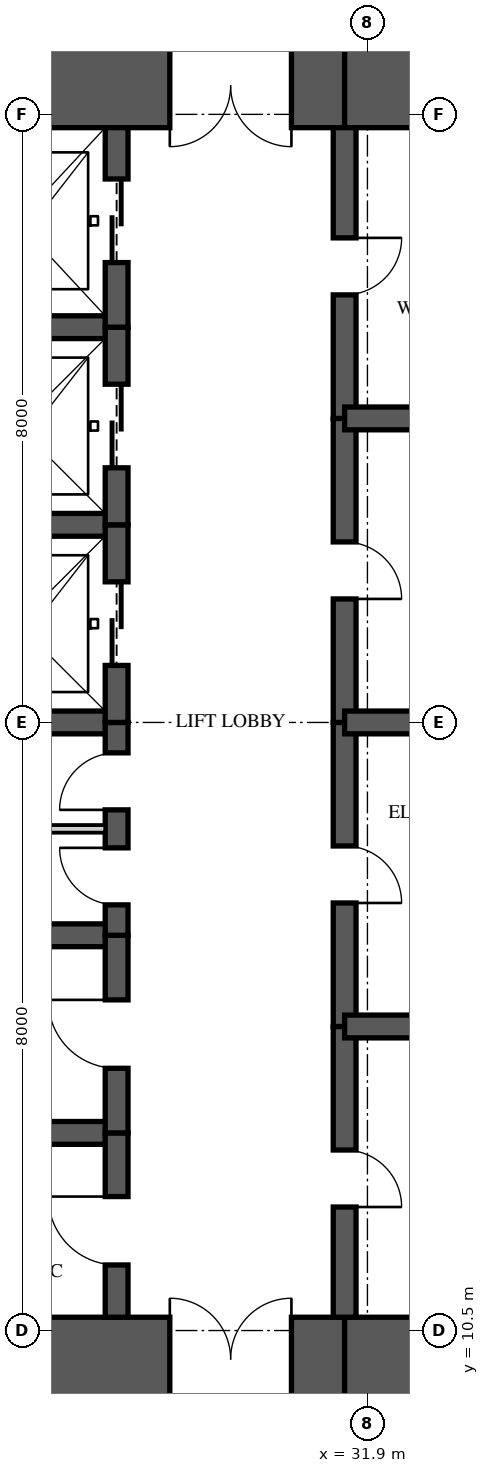
"""IFC4 building model, lengths in metres.
Left out: names, types, materials, properties, quantities, classifications, styles, units other than length and angle.
Written with IfcOpenShell. Run it as: python <this file> out.ifc"""

import sys

from ifc_helpers import new_model, si_unit, direction, frame, frame_2d, origin, place, context, subcontext, project, spatial, rectangle, extrude, element, fill, save


model = new_model("IFC4")
c1 = context("Model", 3, precision=1e-05, world=origin(), true_north=direction((0.0, 1.0)))
c2 = subcontext(c1, "Body", "Model", "MODEL_VIEW")
j1 = project(units=[si_unit("LENGTHUNIT", "METRE"), si_unit("PLANEANGLEUNIT", "RADIAN")], contexts=[c1])
p1 = place(None, origin())
s1 = spatial("IfcSite", under=j1, at=p1, CompositionType="ELEMENT")
p2 = place(p1, origin())
s2 = spatial("IfcBuilding", under=s1, at=p2, CompositionType="ELEMENT")
p3 = place(p2, frame((0.0, 0.0, 249.45)))
s3 = spatial("IfcBuildingStorey", under=s2, at=p3, CompositionType="ELEMENT", Elevation=249.45)
p4 = place(p3, frame((26.0, 10.125, 0.0), z_axis=(0.0, 0.0, 1.0), x_axis=(1.0, 0.0, 0.0)))
e1 = element("IfcWall", 1, at=p4, inside=s3, PredefinedType="SHEAR", context=c2, shape_type="SweptSolid", body=[
    extrude(rectangle(XDim=5.6, YDim=1.1, at=frame_2d((2.8, 0.0))), origin(), (0.0, 0.0, 1.0), 3.5),
])
p5 = place(p4, frame((3.3, 0.0, 0.0)))
e2 = element("IfcOpeningElement", 2, at=p5, cuts=e1, PredefinedType="OPENING", context=c2, shape_type="SweptSolid", body=[
    extrude(rectangle(XDim=1.6, YDim=2.1, at=frame_2d((0.8, 1.05))), frame((0.0, 0.56, 0.0), z_axis=(0.0, -1.0, 0.0), x_axis=(1.0, 0.0, 0.0)), (0.0, 0.0, 1.0), 1.12),
])
for number, where, z_axis, x_axis in (
    (3, (31.6, 10.125, 0.0), (0.0, 0.0, 1.0), (1.0, 0.0, 0.0)),
    (4, (35.9, 26.875, 0.0), (0.0, 0.0, 1.0), (-1.0, 0.0, 0.0)),
):
    element("IfcWall", number, at=place(p3, frame(where, z_axis=z_axis, x_axis=x_axis)), inside=s3, PredefinedType="SHEAR", context=c2, shape_type="SweptSolid", body=[
        extrude(rectangle(XDim=4.3, YDim=1.1, at=frame_2d((2.15, 0.0))), origin(), (0.0, 0.0, 1.0), 3.5),
    ])
p6 = place(p3, frame((31.6, 26.875, 0.0), z_axis=(0.0, 0.0, 1.0), x_axis=(-1.0, 0.0, 0.0)))
e5 = element("IfcWall", 5, at=p6, inside=s3, PredefinedType="SHEAR", context=c2, shape_type="SweptSolid", body=[
    extrude(rectangle(XDim=5.6, YDim=1.1, at=frame_2d((2.8, 0.0))), origin(), (0.0, 0.0, 1.0), 3.5),
])
p7 = place(p6, frame((0.7, 0.0, 0.0)))
e6 = element("IfcOpeningElement", 6, at=p7, cuts=e5, PredefinedType="OPENING", context=c2, shape_type="SweptSolid", body=[
    extrude(rectangle(XDim=1.6, YDim=2.1, at=frame_2d((0.8, 1.05))), frame((0.0, 0.56, 0.0), z_axis=(0.0, -1.0, 0.0), x_axis=(1.0, 0.0, 0.0)), (0.0, 0.0, 1.0), 1.12),
])
p8 = place(p3, frame((28.6, 10.675, 0.0), z_axis=(0.0, 0.0, 1.0), x_axis=(0.0, 1.0, 0.0)))
e7 = element("IfcWall", 7, at=p8, inside=s3, PredefinedType="SHEAR", context=c2, shape_type="SweptSolid", body=[
    extrude(rectangle(XDim=2.425, YDim=0.3, at=frame_2d((1.212, 0.0))), origin(), (0.0, 0.0, 1.0), 3.5),
])
p9 = place(p8, frame((0.688, 0.0, 0.0)))
e8 = element("IfcOpeningElement", 8, at=p9, cuts=e7, PredefinedType="OPENING", context=c2, shape_type="SweptSolid", body=[
    extrude(rectangle(XDim=0.9, YDim=2.1, at=frame_2d((0.45, 1.05))), frame((0.0, 0.16, 0.0), z_axis=(0.0, -1.0, 0.0), x_axis=(1.0, 0.0, 0.0)), (0.0, 0.0, 1.0), 0.32),
])
p10 = place(p3, frame((28.6, 13.1, 0.0), z_axis=(0.0, 0.0, 1.0), x_axis=(0.0, 1.0, 0.0)))
e9 = element("IfcWall", 9, at=p10, inside=s3, PredefinedType="SHEAR", context=c2, shape_type="SweptSolid", body=[
    extrude(rectangle(XDim=2.6, YDim=0.3, at=frame_2d((1.3, 0.0))), origin(), (0.0, 0.0, 1.0), 3.5),
])
p11 = place(p10, frame((0.85, 0.0, 0.0)))
e10 = element("IfcOpeningElement", 10, at=p11, cuts=e9, PredefinedType="OPENING", context=c2, shape_type="SweptSolid", body=[
    extrude(rectangle(XDim=0.9, YDim=2.1, at=frame_2d((0.45, 1.05))), frame((0.0, 0.16, 0.0), z_axis=(0.0, -1.0, 0.0), x_axis=(1.0, 0.0, 0.0)), (0.0, 0.0, 1.0), 0.32),
])
p12 = place(p3, frame((28.6, 15.7, 0.0), z_axis=(0.0, 0.0, 1.0), x_axis=(0.0, 1.0, 0.0)))
e11 = element("IfcWall", 11, at=p12, inside=s3, PredefinedType="SHEAR", context=c2, shape_type="SweptSolid", body=[
    extrude(rectangle(XDim=2.8, YDim=0.3, at=frame_2d((1.4, 0.0))), origin(), (0.0, 0.0, 1.0), 3.5),
])
p13 = place(p12, frame((0.4, 0.0, 0.0)))
e12 = element("IfcOpeningElement", 12, at=p13, cuts=e11, PredefinedType="OPENING", context=c2, shape_type="SweptSolid", body=[
    extrude(rectangle(XDim=0.75, YDim=2.1, at=frame_2d((0.375, 1.05))), frame((0.0, 0.16, 0.0), z_axis=(0.0, -1.0, 0.0), x_axis=(1.0, 0.0, 0.0)), (0.0, 0.0, 1.0), 0.32),
])
p14 = place(p12, frame((1.65, 0.0, 0.0)))
e13 = element("IfcOpeningElement", 13, at=p14, cuts=e11, PredefinedType="OPENING", context=c2, shape_type="SweptSolid", body=[
    extrude(rectangle(XDim=0.75, YDim=2.1, at=frame_2d((0.375, 1.05))), frame((0.0, 0.16, 0.0), z_axis=(0.0, -1.0, 0.0), x_axis=(1.0, 0.0, 0.0)), (0.0, 0.0, 1.0), 0.32),
])
p15 = place(p3, frame((28.6, 18.5, 0.0), z_axis=(0.0, 0.0, 1.0), x_axis=(0.0, 1.0, 0.0)))
e14 = element("IfcWall", 14, at=p15, inside=s3, PredefinedType="SHEAR", context=c2, shape_type="SweptSolid", body=[
    extrude(rectangle(XDim=2.6, YDim=0.3, at=frame_2d((1.3, 0.0))), origin(), (0.0, 0.0, 1.0), 3.5),
])
p16 = place(p15, frame((0.75, 0.0, 0.0)))
e15 = element("IfcOpeningElement", 15, at=p16, cuts=e14, PredefinedType="OPENING", context=c2, shape_type="SweptSolid", body=[
    extrude(rectangle(XDim=1.1, YDim=2.1, at=frame_2d((0.55, 1.05))), frame((0.0, 0.16, 0.0), z_axis=(0.0, -1.0, 0.0), x_axis=(1.0, 0.0, 0.0)), (0.0, 0.0, 1.0), 0.32),
])
p17 = place(p3, frame((28.6, 21.1, 0.0), z_axis=(0.0, 0.0, 1.0), x_axis=(0.0, 1.0, 0.0)))
e16 = element("IfcWall", 16, at=p17, inside=s3, PredefinedType="SHEAR", context=c2, shape_type="SweptSolid", body=[
    extrude(rectangle(XDim=2.6, YDim=0.3, at=frame_2d((1.3, 0.0))), origin(), (0.0, 0.0, 1.0), 3.5),
])
p18 = place(p17, frame((0.75, 0.0, 0.0)))
e17 = element("IfcOpeningElement", 17, at=p18, cuts=e16, PredefinedType="OPENING", context=c2, shape_type="SweptSolid", body=[
    extrude(rectangle(XDim=1.1, YDim=2.1, at=frame_2d((0.55, 1.05))), frame((0.0, 0.16, 0.0), z_axis=(0.0, -1.0, 0.0), x_axis=(1.0, 0.0, 0.0)), (0.0, 0.0, 1.0), 0.32),
])
p19 = place(p3, frame((28.6, 23.7, 0.0), z_axis=(0.0, 0.0, 1.0), x_axis=(0.0, 1.0, 0.0)))
e18 = element("IfcWall", 18, at=p19, inside=s3, PredefinedType="SHEAR", context=c2, shape_type="SweptSolid", body=[
    extrude(rectangle(XDim=2.625, YDim=0.3, at=frame_2d((1.312, 0.0))), origin(), (0.0, 0.0, 1.0), 3.5),
])
p20 = place(p19, frame((0.85, 0.0, 0.0)))
e19 = element("IfcOpeningElement", 19, at=p20, cuts=e18, PredefinedType="OPENING", context=c2, shape_type="SweptSolid", body=[
    extrude(rectangle(XDim=1.1, YDim=2.1, at=frame_2d((0.55, 1.05))), frame((0.0, 0.16, 0.0), z_axis=(0.0, -1.0, 0.0), x_axis=(1.0, 0.0, 0.0)), (0.0, 0.0, 1.0), 0.32),
])
p21 = place(p3, frame((31.6, 10.675, 0.0), z_axis=(0.0, 0.0, 1.0), x_axis=(0.0, 1.0, 0.0)))
e20 = element("IfcWall", 20, at=p21, inside=s3, PredefinedType="SHEAR", context=c2, shape_type="SweptSolid", body=[
    extrude(rectangle(XDim=3.825, YDim=0.3, at=frame_2d((1.913, 0.0))), origin(), (0.0, 0.0, 1.0), 3.5),
])
p22 = place(p21, frame((1.45, 0.0, 0.0)))
e21 = element("IfcOpeningElement", 21, at=p22, cuts=e20, PredefinedType="OPENING", context=c2, shape_type="SweptSolid", body=[
    extrude(rectangle(XDim=0.75, YDim=2.1, at=frame_2d((0.375, 1.05))), frame((0.0, 0.16, 0.0), z_axis=(0.0, -1.0, 0.0), x_axis=(1.0, 0.0, 0.0)), (0.0, 0.0, 1.0), 0.32),
])
p23 = place(p3, frame((31.6, 14.5, 0.0), z_axis=(0.0, 0.0, 1.0), x_axis=(0.0, 1.0, 0.0)))
e22 = element("IfcWall", 22, at=p23, inside=s3, PredefinedType="SHEAR", context=c2, shape_type="SweptSolid", body=[
    extrude(rectangle(XDim=4.0, YDim=0.3, at=frame_2d((2.0, 0.0))), origin(), (0.0, 0.0, 1.0), 3.5),
])
p24 = place(p23, frame((1.625, 0.0, 0.0)))
e23 = element("IfcOpeningElement", 23, at=p24, cuts=e22, PredefinedType="OPENING", context=c2, shape_type="SweptSolid", body=[
    extrude(rectangle(XDim=0.75, YDim=2.1, at=frame_2d((0.375, 1.05))), frame((0.0, 0.16, 0.0), z_axis=(0.0, -1.0, 0.0), x_axis=(1.0, 0.0, 0.0)), (0.0, 0.0, 1.0), 0.32),
])
p25 = place(p3, frame((31.6, 18.5, 0.0), z_axis=(0.0, 0.0, 1.0), x_axis=(0.0, 1.0, 0.0)))
e24 = element("IfcWall", 24, at=p25, inside=s3, PredefinedType="SHEAR", context=c2, shape_type="SweptSolid", body=[
    extrude(rectangle(XDim=4.0, YDim=0.3, at=frame_2d((2.0, 0.0))), origin(), (0.0, 0.0, 1.0), 3.5),
])
p26 = place(p25, frame((1.625, 0.0, 0.0)))
e25 = element("IfcOpeningElement", 25, at=p26, cuts=e24, PredefinedType="OPENING", context=c2, shape_type="SweptSolid", body=[
    extrude(rectangle(XDim=0.75, YDim=2.1, at=frame_2d((0.375, 1.05))), frame((0.0, 0.16, 0.0), z_axis=(0.0, -1.0, 0.0), x_axis=(1.0, 0.0, 0.0)), (0.0, 0.0, 1.0), 0.32),
])
p27 = place(p3, frame((31.6, 22.5, 0.0), z_axis=(0.0, 0.0, 1.0), x_axis=(0.0, 1.0, 0.0)))
e26 = element("IfcWall", 26, at=p27, inside=s3, PredefinedType="SHEAR", context=c2, shape_type="SweptSolid", body=[
    extrude(rectangle(XDim=3.825, YDim=0.3, at=frame_2d((1.913, 0.0))), origin(), (0.0, 0.0, 1.0), 3.5),
])
p28 = place(p27, frame((1.625, 0.0, 0.0)))
e27 = element("IfcOpeningElement", 27, at=p28, cuts=e26, PredefinedType="OPENING", context=c2, shape_type="SweptSolid", body=[
    extrude(rectangle(XDim=0.75, YDim=2.1, at=frame_2d((0.375, 1.05))), frame((0.0, 0.16, 0.0), z_axis=(0.0, -1.0, 0.0), x_axis=(1.0, 0.0, 0.0)), (0.0, 0.0, 1.0), 0.32),
])
for number, where, z_axis, x_axis in (
    (28, (26.0, 13.1, 0.0), (0.0, 0.0, 1.0), (1.0, 0.0, 0.0)),
    (29, (26.0, 15.7, 0.0), (0.0, 0.0, 1.0), (1.0, 0.0, 0.0)),
    (30, (26.0, 18.5, 0.0), (0.0, 0.0, 1.0), (1.0, 0.0, 0.0)),
    (31, (26.0, 21.1, 0.0), (0.0, 0.0, 1.0), (1.0, 0.0, 0.0)),
    (32, (26.0, 23.7, 0.0), (0.0, 0.0, 1.0), (1.0, 0.0, 0.0)),
):
    element("IfcWall", number, at=place(p3, frame(where, z_axis=z_axis, x_axis=x_axis)), inside=s3, PredefinedType="SHEAR", context=c2, shape_type="SweptSolid", body=[
        extrude(rectangle(XDim=2.6, YDim=0.3, at=frame_2d((1.3, 0.0))), origin(), (0.0, 0.0, 1.0), 3.5),
    ])
for number, where, z_axis, x_axis in (
    (33, (31.6, 14.5, 0.0), (0.0, 0.0, 1.0), (1.0, 0.0, 0.0)),
    (34, (31.6, 18.5, 0.0), (0.0, 0.0, 1.0), (1.0, 0.0, 0.0)),
    (35, (31.6, 22.5, 0.0), (0.0, 0.0, 1.0), (1.0, 0.0, 0.0)),
):
    element("IfcWall", number, at=place(p3, frame(where, z_axis=z_axis, x_axis=x_axis)), inside=s3, PredefinedType="SHEAR", context=c2, shape_type="SweptSolid", body=[
        extrude(rectangle(XDim=4.3, YDim=0.3, at=frame_2d((2.15, 0.0))), origin(), (0.0, 0.0, 1.0), 3.5),
    ])
p29 = place(p3, frame((26.15, 17.1, 0.0), z_axis=(0.0, 0.0, 1.0), x_axis=(1.0, 0.0, 0.0)))
e36 = element("IfcWall", 36, at=p29, inside=s3, PredefinedType="PARTITIONING", context=c2, shape_type="SweptSolid", body=[
    extrude(rectangle(XDim=2.3, YDim=0.1, at=frame_2d((1.15, 0.0))), origin(), (0.0, 0.0, 1.0), 3.26),
])
p30 = place(p16, origin())
e37 = element("IfcDoor", 37, at=p30, inside=s3, OperationType="SLIDING_TO_LEFT", PredefinedType="DOOR", context=c2, shape_type="SweptSolid", body=[
    extrude(rectangle(XDim=1.1, YDim=2.1, at=frame_2d((0.55, 1.05))), frame((0.0, 0.025, 0.0), z_axis=(0.0, -1.0, 0.0), x_axis=(1.0, 0.0, 0.0)), (0.0, 0.0, 1.0), 0.05),
])
fill(e15, e37)
p31 = place(p18, origin())
e38 = element("IfcDoor", 38, at=p31, inside=s3, OperationType="SLIDING_TO_LEFT", PredefinedType="DOOR", context=c2, shape_type="SweptSolid", body=[
    extrude(rectangle(XDim=1.1, YDim=2.1, at=frame_2d((0.55, 1.05))), frame((0.0, 0.025, 0.0), z_axis=(0.0, -1.0, 0.0), x_axis=(1.0, 0.0, 0.0)), (0.0, 0.0, 1.0), 0.05),
])
fill(e17, e38)
p32 = place(p20, origin())
e39 = element("IfcDoor", 39, at=p32, inside=s3, OperationType="SLIDING_TO_LEFT", PredefinedType="DOOR", context=c2, shape_type="SweptSolid", body=[
    extrude(rectangle(XDim=1.1, YDim=2.1, at=frame_2d((0.55, 1.05))), frame((0.0, 0.025, 0.0), z_axis=(0.0, -1.0, 0.0), x_axis=(1.0, 0.0, 0.0)), (0.0, 0.0, 1.0), 0.05),
])
fill(e19, e39)
p33 = place(p9, origin())
e40 = element("IfcDoor", 40, at=p33, inside=s3, OperationType="SINGLE_SWING_RIGHT", PredefinedType="DOOR", context=c2, shape_type="SweptSolid", body=[
    extrude(rectangle(XDim=0.9, YDim=2.1, at=frame_2d((0.45, 1.05))), frame((0.0, 0.025, 0.0), z_axis=(0.0, -1.0, 0.0), x_axis=(1.0, 0.0, 0.0)), (0.0, 0.0, 1.0), 0.05),
])
fill(e8, e40)
p34 = place(p11, origin())
e41 = element("IfcDoor", 41, at=p34, inside=s3, OperationType="SINGLE_SWING_RIGHT", PredefinedType="DOOR", context=c2, shape_type="SweptSolid", body=[
    extrude(rectangle(XDim=0.9, YDim=2.1, at=frame_2d((0.45, 1.05))), frame((0.0, 0.025, 0.0), z_axis=(0.0, -1.0, 0.0), x_axis=(1.0, 0.0, 0.0)), (0.0, 0.0, 1.0), 0.05),
])
fill(e10, e41)
p35 = place(p13, origin())
e42 = element("IfcDoor", 42, at=p35, inside=s3, OperationType="SINGLE_SWING_RIGHT", PredefinedType="DOOR", context=c2, shape_type="SweptSolid", body=[
    extrude(rectangle(XDim=0.75, YDim=2.1, at=frame_2d((0.375, 1.05))), frame((0.0, 0.025, 0.0), z_axis=(0.0, -1.0, 0.0), x_axis=(1.0, 0.0, 0.0)), (0.0, 0.0, 1.0), 0.05),
])
fill(e12, e42)
p36 = place(p14, origin())
e43 = element("IfcDoor", 43, at=p36, inside=s3, OperationType="SINGLE_SWING_LEFT", PredefinedType="DOOR", context=c2, shape_type="SweptSolid", body=[
    extrude(rectangle(XDim=0.75, YDim=2.1, at=frame_2d((0.375, 1.05))), frame((0.0, 0.025, 0.0), z_axis=(0.0, -1.0, 0.0), x_axis=(1.0, 0.0, 0.0)), (0.0, 0.0, 1.0), 0.05),
])
fill(e13, e43)
p37 = place(p5, origin())
e44 = element("IfcDoor", 44, at=p37, inside=s3, OperationType="DOUBLE_DOOR_SINGLE_SWING", PredefinedType="DOOR", context=c2, shape_type="SweptSolid", body=[
    extrude(rectangle(XDim=1.6, YDim=2.1, at=frame_2d((0.8, 1.05))), frame((0.0, 0.025, 0.0), z_axis=(0.0, -1.0, 0.0), x_axis=(1.0, 0.0, 0.0)), (0.0, 0.0, 1.0), 0.05),
])
fill(e2, e44)
p38 = place(p7, origin())
e45 = element("IfcDoor", 45, at=p38, inside=s3, OperationType="DOUBLE_DOOR_SINGLE_SWING", PredefinedType="DOOR", context=c2, shape_type="SweptSolid", body=[
    extrude(rectangle(XDim=1.6, YDim=2.1, at=frame_2d((0.8, 1.05))), frame((0.0, 0.025, 0.0), z_axis=(0.0, -1.0, 0.0), x_axis=(1.0, 0.0, 0.0)), (0.0, 0.0, 1.0), 0.05),
])
fill(e6, e45)
p39 = place(p22, frame((0.75, 0.0, 0.0), z_axis=(0.0, 0.0, 1.0), x_axis=(-1.0, 0.0, 0.0)))
e46 = element("IfcDoor", 46, at=p39, inside=s3, OperationType="SINGLE_SWING_RIGHT", PredefinedType="DOOR", context=c2, shape_type="SweptSolid", body=[
    extrude(rectangle(XDim=0.75, YDim=2.1, at=frame_2d((0.375, 1.05))), frame((0.0, 0.025, 0.0), z_axis=(0.0, -1.0, 0.0), x_axis=(1.0, 0.0, 0.0)), (0.0, 0.0, 1.0), 0.05),
])
fill(e21, e46)
p40 = place(p24, frame((0.75, 0.0, 0.0), z_axis=(0.0, 0.0, 1.0), x_axis=(-1.0, 0.0, 0.0)))
e47 = element("IfcDoor", 47, at=p40, inside=s3, OperationType="SINGLE_SWING_RIGHT", PredefinedType="DOOR", context=c2, shape_type="SweptSolid", body=[
    extrude(rectangle(XDim=0.75, YDim=2.1, at=frame_2d((0.375, 1.05))), frame((0.0, 0.025, 0.0), z_axis=(0.0, -1.0, 0.0), x_axis=(1.0, 0.0, 0.0)), (0.0, 0.0, 1.0), 0.05),
])
fill(e23, e47)
p41 = place(p26, frame((0.75, 0.0, 0.0), z_axis=(0.0, 0.0, 1.0), x_axis=(-1.0, 0.0, 0.0)))
e48 = element("IfcDoor", 48, at=p41, inside=s3, OperationType="SINGLE_SWING_RIGHT", PredefinedType="DOOR", context=c2, shape_type="SweptSolid", body=[
    extrude(rectangle(XDim=0.75, YDim=2.1, at=frame_2d((0.375, 1.05))), frame((0.0, 0.025, 0.0), z_axis=(0.0, -1.0, 0.0), x_axis=(1.0, 0.0, 0.0)), (0.0, 0.0, 1.0), 0.05),
])
fill(e25, e48)
p42 = place(p28, frame((0.75, 0.0, 0.0), z_axis=(0.0, 0.0, 1.0), x_axis=(-1.0, 0.0, 0.0)))
e49 = element("IfcDoor", 49, at=p42, inside=s3, OperationType="SINGLE_SWING_LEFT", PredefinedType="DOOR", context=c2, shape_type="SweptSolid", body=[
    extrude(rectangle(XDim=0.75, YDim=2.1, at=frame_2d((0.375, 1.05))), frame((0.0, 0.025, 0.0), z_axis=(0.0, -1.0, 0.0), x_axis=(1.0, 0.0, 0.0)), (0.0, 0.0, 1.0), 0.05),
])
fill(e27, e49)
save(model, sys.argv[1])
